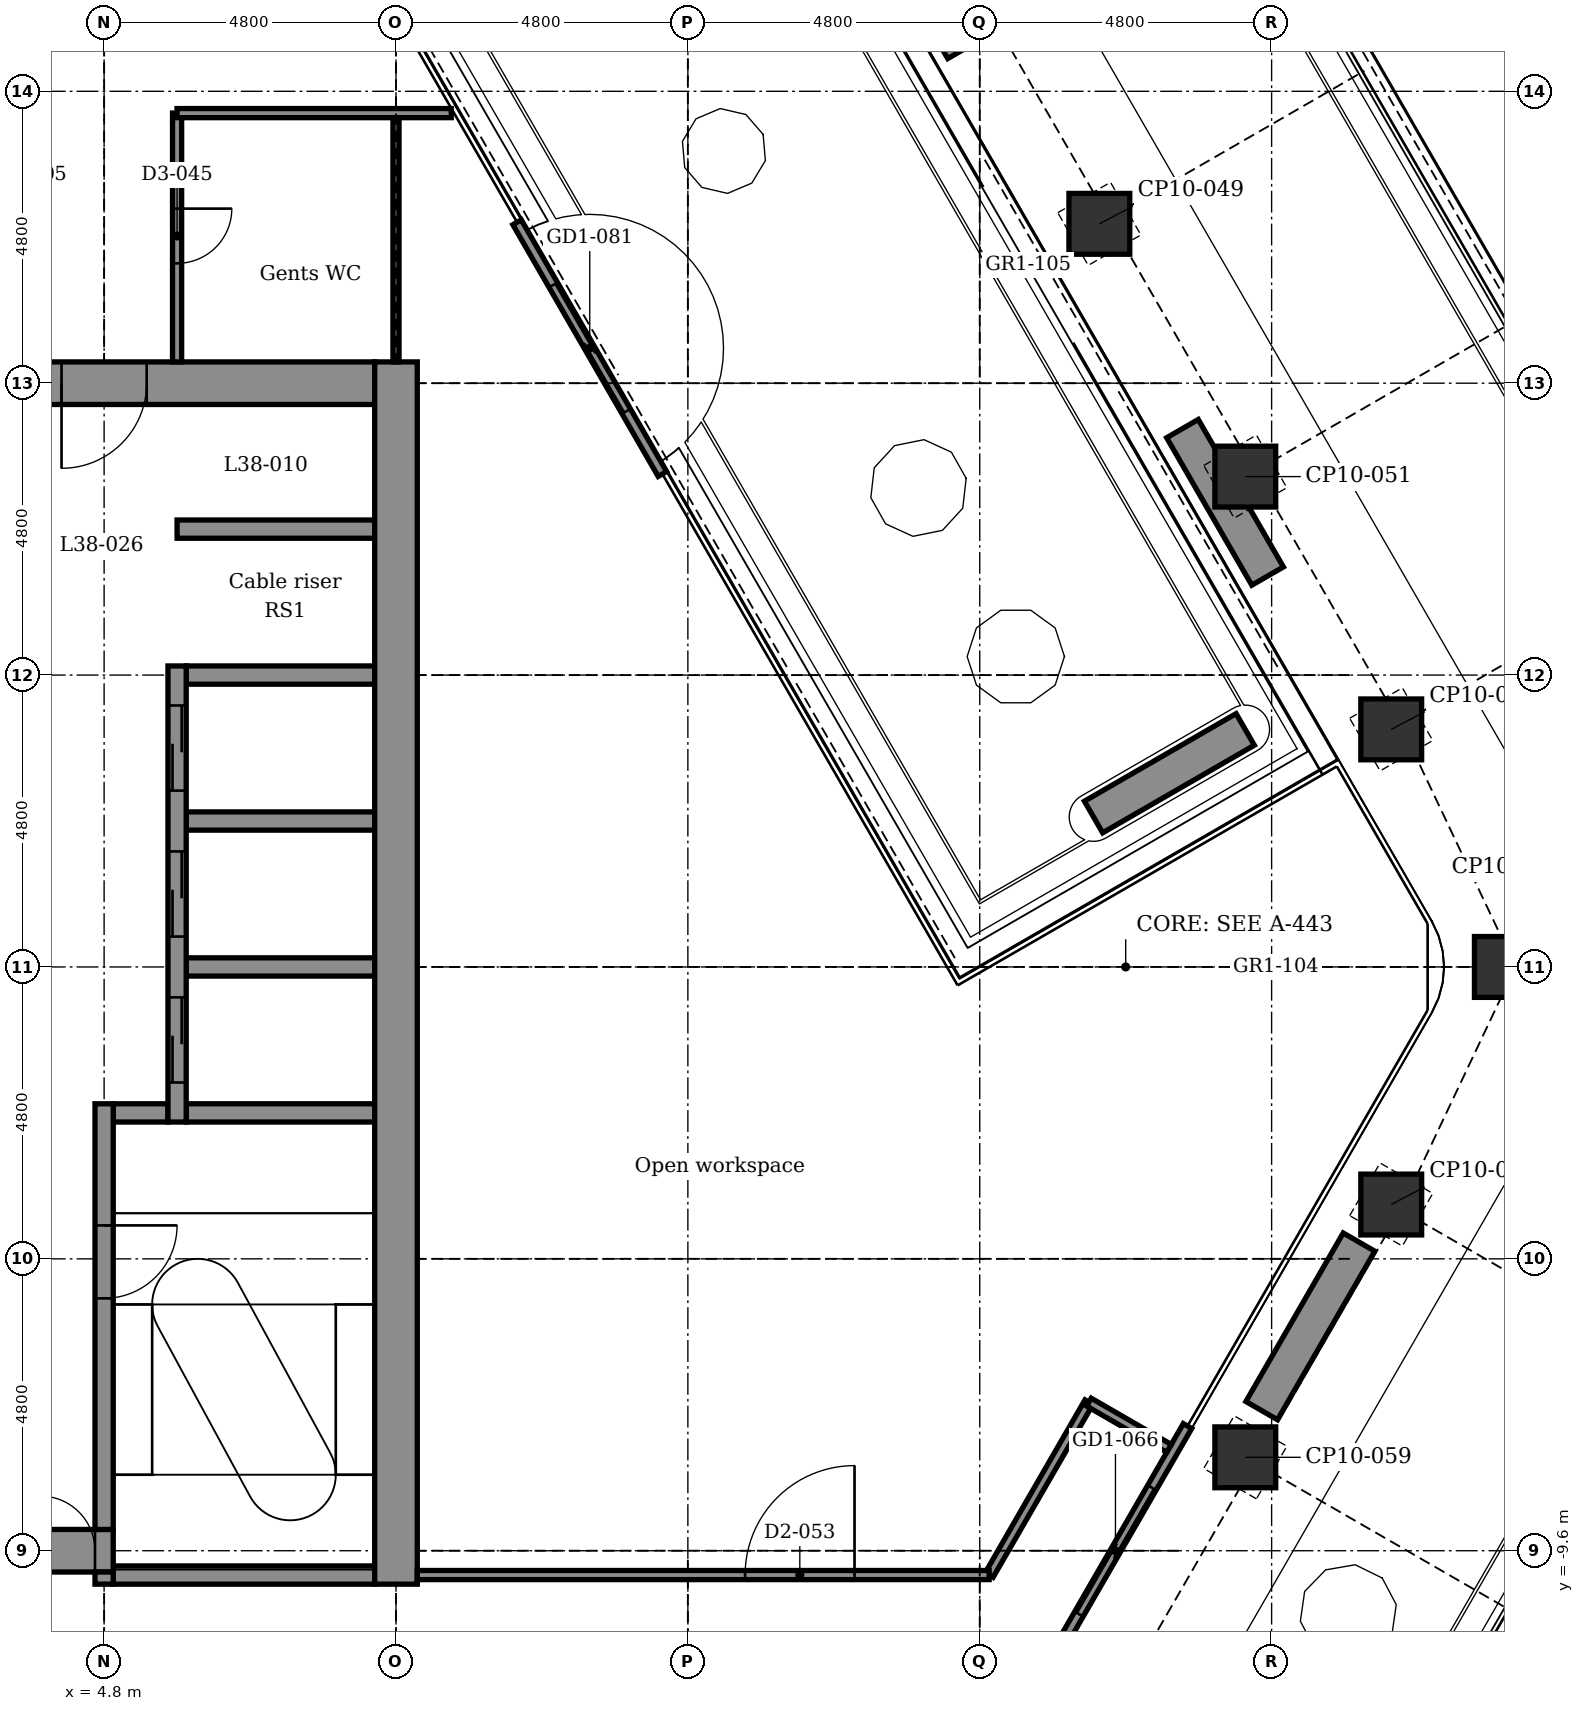
"""IFC4 building model, lengths in metres.
Left out: names, types, materials, properties, quantities, classifications, styles, units other than length and angle.
Written with IfcOpenShell. Run it as: python <this file> out.ifc"""

import sys

from ifc_helpers import new_model, si_unit, direction, frame, frame_2d, origin, origin_2d, place, context, subcontext, project, spatial, rectangle, extrude, element, fill, save


model = new_model("IFC4")
c1 = context("Model", 3, precision=1e-05, world=origin(), true_north=direction((0.0, 1.0)))
c2 = subcontext(c1, "Body", "Model", "MODEL_VIEW")
j1 = project(units=[si_unit("LENGTHUNIT", "METRE"), si_unit("PLANEANGLEUNIT", "RADIAN")], contexts=[c1])
p1 = place(None, origin())
s1 = spatial("IfcSite", under=j1, at=p1, CompositionType="ELEMENT")
p2 = place(p1, origin())
s2 = spatial("IfcBuilding", under=s1, at=p2, CompositionType="ELEMENT")
p3 = place(p2, frame((0.0, 0.0, 181.7)))
s3 = spatial("IfcBuildingStorey", under=s2, at=p3, CompositionType="ELEMENT", Elevation=181.7)
for number, where, z_axis, x_axis in (
    (1, (21.167, 12.221, -0.15), (0.0, 0.0, 1.0), (0.866, 0.5, 0.0)),
    (2, (23.567, 8.064, -0.15), (0.0, 0.0, 1.0), (0.866, 0.5, 0.0)),
    (3, (25.967, 3.907, -0.15), (0.0, 0.0, 1.0), (0.866, 0.5, 0.0)),
    (4, (27.836, 0.0, -0.15), (0.0, 0.0, 1.0), (1.0, 0.0, 0.0)),
    (5, (25.967, -3.907, -0.15), (0.0, 0.0, 1.0), (0.5, 0.866, 0.0)),
    (6, (23.567, -8.064, -0.15), (0.0, 0.0, 1.0), (0.5, 0.866, 0.0)),
):
    element("IfcColumn", number, at=place(p3, frame(where, z_axis=z_axis, x_axis=x_axis)), inside=s3, PredefinedType="COLUMN", context=c2, shape_type="SweptSolid", body=[
        extrude(rectangle(XDim=1.0, YDim=1.0, at=origin_2d()), origin(), (0.0, 0.0, 1.0), 3.9),
    ])
p4 = place(p3, frame((4.95, -10.0, -0.15), z_axis=(0.0, 0.0, 1.0), x_axis=(1.0, 0.0, 0.0)))
e7 = element("IfcWall", 7, at=p4, inside=s3, PredefinedType="STANDARD", context=c2, shape_type="SweptSolid", body=[
    extrude(rectangle(XDim=4.3, YDim=0.3, at=frame_2d((2.15, 0.0))), origin(), (0.0, 0.0, 1.0), 3.9),
])
p5 = place(p3, frame((-5.25, -9.6, -0.15), z_axis=(0.0, 0.0, 1.0), x_axis=(1.0, 0.0, 0.0)))
e8 = element("IfcWall", 8, at=p5, inside=s3, PredefinedType="SHEAR", context=c2, shape_type="SweptSolid", body=[
    extrude(rectangle(XDim=10.2, YDim=0.7, at=frame_2d((5.1, 0.0))), origin(), (0.0, 0.0, 1.0), 3.9),
])
p6 = place(p5, frame((9.0, 0.0, 0.15)))
e9 = element("IfcOpeningElement", 9, at=p6, cuts=e8, PredefinedType="OPENING", context=c2, shape_type="SweptSolid", body=[
    extrude(rectangle(XDim=0.9, YDim=2.1, at=frame_2d((0.45, 1.05))), frame((0.0, 0.36, 0.0), z_axis=(0.0, -1.0, 0.0), x_axis=(1.0, 0.0, 0.0)), (0.0, 0.0, 1.0), 0.72),
])
p7 = place(p3, frame((4.95, -2.4, -0.15), z_axis=(0.0, 0.0, 1.0), x_axis=(1.0, 0.0, 0.0)))
e10 = element("IfcWall", 10, at=p7, inside=s3, PredefinedType="STANDARD", context=c2, shape_type="SweptSolid", body=[
    extrude(rectangle(XDim=0.9, YDim=0.3, at=frame_2d((0.45, 0.0))), origin(), (0.0, 0.0, 1.0), 3.9),
])
for number, where, z_axis, x_axis in (
    (11, (6.15, -2.4, -0.15), (0.0, 0.0, 1.0), (1.0, 0.0, 0.0)),
    (12, (6.15, 0.0, -0.15), (0.0, 0.0, 1.0), (1.0, 0.0, 0.0)),
    (13, (6.15, 2.4, -0.15), (0.0, 0.0, 1.0), (1.0, 0.0, 0.0)),
    (14, (6.15, 4.8, -0.15), (0.0, 0.0, 1.0), (1.0, 0.0, 0.0)),
):
    element("IfcWall", number, at=place(p3, frame(where, z_axis=z_axis, x_axis=x_axis)), inside=s3, PredefinedType="STANDARD", context=c2, shape_type="SweptSolid", body=[
        extrude(rectangle(XDim=3.1, YDim=0.3, at=frame_2d((1.55, 0.0))), origin(), (0.0, 0.0, 1.0), 3.9),
    ])
p8 = place(p3, frame((6.0, 7.2, -0.15), z_axis=(0.0, 0.0, 1.0), x_axis=(1.0, 0.0, 0.0)))
e15 = element("IfcWall", 15, at=p8, inside=s3, PredefinedType="STANDARD", context=c2, shape_type="SweptSolid", body=[
    extrude(rectangle(XDim=3.25, YDim=0.3, at=frame_2d((1.625, 0.0))), origin(), (0.0, 0.0, 1.0), 3.9),
])
p9 = place(p3, frame((-5.25, 9.6, -0.15), z_axis=(0.0, 0.0, 1.0), x_axis=(1.0, 0.0, 0.0)))
e16 = element("IfcWall", 16, at=p9, inside=s3, PredefinedType="SHEAR", context=c2, shape_type="SweptSolid", body=[
    extrude(rectangle(XDim=14.5, YDim=0.7, at=frame_2d((7.25, 0.0))), origin(), (0.0, 0.0, 1.0), 3.9),
])
p10 = place(p9, frame((9.35, 0.0, 0.15)))
e17 = element("IfcOpeningElement", 17, at=p10, cuts=e16, PredefinedType="OPENING", context=c2, shape_type="SweptSolid", body=[
    extrude(rectangle(XDim=1.4, YDim=2.1, at=frame_2d((0.7, 1.05))), frame((0.0, 0.36, 0.0), z_axis=(0.0, -1.0, 0.0), x_axis=(1.0, 0.0, 0.0)), (0.0, 0.0, 1.0), 0.72),
])
p11 = place(p3, frame((4.8, -10.15, -0.15), z_axis=(0.0, 0.0, 1.0), x_axis=(0.0, 1.0, 0.0)))
e18 = element("IfcWall", 18, at=p11, inside=s3, PredefinedType="STANDARD", context=c2, shape_type="SweptSolid", body=[
    extrude(rectangle(XDim=0.2, YDim=0.3, at=frame_2d((0.1, 0.0))), origin(), (0.0, 0.0, 1.0), 3.9),
])
p12 = place(p3, frame((4.8, -9.25, -0.15), z_axis=(0.0, 0.0, 1.0), x_axis=(0.0, 1.0, 0.0)))
e19 = element("IfcWall", 19, at=p12, inside=s3, PredefinedType="STANDARD", context=c2, shape_type="SweptSolid", body=[
    extrude(rectangle(XDim=7.0, YDim=0.3, at=frame_2d((3.5, 0.0))), origin(), (0.0, 0.0, 1.0), 3.9),
])
p13 = place(p12, frame((3.8, 0.0, 0.15)))
e20 = element("IfcOpeningElement", 20, at=p13, cuts=e19, PredefinedType="OPENING", context=c2, shape_type="SweptSolid", body=[
    extrude(rectangle(XDim=1.2, YDim=2.1, at=frame_2d((0.6, 1.05))), frame((0.0, 0.16, 0.0), z_axis=(0.0, -1.0, 0.0), x_axis=(1.0, 0.0, 0.0)), (0.0, 0.0, 1.0), 0.32),
])
p14 = place(p3, frame((6.0, -2.55, -0.15), z_axis=(0.0, 0.0, 1.0), x_axis=(0.0, 1.0, 0.0)))
e21 = element("IfcWall", 21, at=p14, inside=s3, PredefinedType="STANDARD", context=c2, shape_type="SweptSolid", body=[
    extrude(rectangle(XDim=7.5, YDim=0.3, at=frame_2d((3.75, 0.0))), origin(), (0.0, 0.0, 1.0), 3.9),
])
p15 = place(p14, frame((0.65, 0.0, 0.15)))
e22 = element("IfcOpeningElement", 22, at=p15, cuts=e21, PredefinedType="OPENING", context=c2, shape_type="SweptSolid", body=[
    extrude(rectangle(XDim=1.4, YDim=2.1, at=frame_2d((0.7, 1.05))), frame((0.0, 0.16, 0.0), z_axis=(0.0, -1.0, 0.0), x_axis=(1.0, 0.0, 0.0)), (0.0, 0.0, 1.0), 0.32),
])
p16 = place(p14, frame((3.05, 0.0, 0.15)))
e23 = element("IfcOpeningElement", 23, at=p16, cuts=e21, PredefinedType="OPENING", context=c2, shape_type="SweptSolid", body=[
    extrude(rectangle(XDim=1.4, YDim=2.1, at=frame_2d((0.7, 1.05))), frame((0.0, 0.16, 0.0), z_axis=(0.0, -1.0, 0.0), x_axis=(1.0, 0.0, 0.0)), (0.0, 0.0, 1.0), 0.32),
])
p17 = place(p14, frame((5.45, 0.0, 0.15)))
e24 = element("IfcOpeningElement", 24, at=p17, cuts=e21, PredefinedType="OPENING", context=c2, shape_type="SweptSolid", body=[
    extrude(rectangle(XDim=1.4, YDim=2.1, at=frame_2d((0.7, 1.05))), frame((0.0, 0.16, 0.0), z_axis=(0.0, -1.0, 0.0), x_axis=(1.0, 0.0, 0.0)), (0.0, 0.0, 1.0), 0.32),
])
p18 = place(p3, frame((9.6, -10.15, -0.15), z_axis=(0.0, 0.0, 1.0), x_axis=(0.0, 1.0, 0.0)))
e25 = element("IfcWall", 25, at=p18, inside=s3, PredefinedType="SHEAR", context=c2, shape_type="SweptSolid", body=[
    extrude(rectangle(XDim=20.1, YDim=0.7, at=frame_2d((10.05, 0.0))), origin(), (0.0, 0.0, 1.0), 3.9),
])
p19 = place(p3, frame((11.591, 12.246, 0.0), z_axis=(0.0, 0.0, 1.0), x_axis=(0.49997888657, -0.866037593286, 0.0)))
e26 = element("IfcWall", 26, at=p19, inside=s3, PredefinedType="PARTITIONING", context=c2, shape_type="SweptSolid", body=[
    extrude(rectangle(XDim=4.78, YDim=0.16, at=frame_2d((2.39, 0.0))), origin(), (0.0, 0.0, 1.0), 3.75),
])
p20 = place(p19, frame((1.19, 0.0, 0.0)))
e27 = element("IfcOpeningElement", 27, at=p20, cuts=e26, PredefinedType="OPENING", context=c2, shape_type="SweptSolid", body=[
    extrude(rectangle(XDim=2.4, YDim=2.4, at=frame_2d((1.2, 1.2))), frame((0.0, 0.09, 0.0), z_axis=(0.0, -1.0, 0.0), x_axis=(1.0, 0.0, 0.0)), (0.0, 0.0, 1.0), 0.18),
])
p21 = place(p3, frame((22.617, -7.55, 0.0), z_axis=(0.0, 0.0, 1.0), x_axis=(-0.5000167099, -0.866015756104, 0.0)))
e28 = element("IfcWall", 28, at=p21, inside=s3, PredefinedType="PARTITIONING", context=c2, shape_type="SweptSolid", body=[
    extrude(rectangle(XDim=4.74, YDim=0.16, at=frame_2d((2.37, 0.0))), origin(), (0.0, 0.0, 1.0), 3.75),
])
p22 = place(p21, frame((1.17, 0.0, 0.0)))
e29 = element("IfcOpeningElement", 29, at=p22, cuts=e28, PredefinedType="OPENING", context=c2, shape_type="SweptSolid", body=[
    extrude(rectangle(XDim=2.4, YDim=2.4, at=frame_2d((1.2, 1.2))), frame((0.0, 0.09, 0.0), z_axis=(0.0, -1.0, 0.0), x_axis=(1.0, 0.0, 0.0)), (0.0, 0.0, 1.0), 0.18),
])
p23 = place(p3, frame((25.437, -4.525, 0.0), z_axis=(0.0, 0.0, 1.0), x_axis=(-0.499938187974, -0.866061088033, 0.0)))
e30 = element("IfcWall", 30, at=p23, inside=s3, PredefinedType="USERDEFINED", context=c2, shape_type="SweptSolid", body=[
    extrude(rectangle(XDim=3.2, YDim=0.6, at=frame_2d((1.6, 0.0))), origin(), (0.0, 0.0, 1.0), 0.7),
])
p24 = place(p3, frame((21.072, 2.466, 0.0), z_axis=(0.0, 0.0, 1.0), x_axis=(0.865996417519, 0.500050202324, 0.0)))
e31 = element("IfcWall", 31, at=p24, inside=s3, PredefinedType="USERDEFINED", context=c2, shape_type="SweptSolid", body=[
    extrude(rectangle(XDim=2.88, YDim=0.6, at=frame_2d((1.44, 0.0))), origin(), (0.0, 0.0, 1.0), 0.7),
])
p25 = place(p3, frame((18.934, 15.088, 0.0), z_axis=(0.0, 0.0, 1.0), x_axis=(-0.500011755427, 0.866018616679, 0.0)))
e32 = element("IfcWall", 32, at=p25, inside=s3, PredefinedType="USERDEFINED", context=c2, shape_type="SweptSolid", body=[
    extrude(rectangle(XDim=2.8, YDim=0.6, at=frame_2d((1.4, 0.0))), origin(), (0.0, 0.0, 1.0), 0.7),
])
p26 = place(p3, frame((22.534, 8.853, 0.0), z_axis=(0.0, 0.0, 1.0), x_axis=(0.500049511043, -0.865996816683, 0.0)))
e33 = element("IfcWall", 33, at=p26, inside=s3, PredefinedType="USERDEFINED", context=c2, shape_type="SweptSolid", body=[
    extrude(rectangle(XDim=2.8, YDim=0.6, at=frame_2d((1.4, 0.0))), origin(), (0.0, 0.0, 1.0), 0.7),
])
p27 = place(p3, frame((9.6, 9.95, 0.0), z_axis=(0.0, 0.0, 1.0), x_axis=(0.0, 1.0, 0.0)))
e34 = element("IfcWall", 34, at=p27, inside=s3, PredefinedType="PARTITIONING", context=c2, shape_type="SweptSolid", body=[
    extrude(rectangle(XDim=4.092, YDim=0.1, at=frame_2d((2.046, 0.0))), origin(), (0.0, 0.0, 1.0), 3.066),
])
p28 = place(p3, frame((6.0, 9.95, 0.0), z_axis=(0.0, 0.0, 1.0), x_axis=(0.0, 1.0, 0.0)))
e35 = element("IfcWall", 35, at=p28, inside=s3, PredefinedType="PARTITIONING", context=c2, shape_type="SweptSolid", body=[
    extrude(rectangle(XDim=4.092, YDim=0.15, at=frame_2d((2.046, 0.0))), origin(), (0.0, 0.0, 1.0), 3.75),
])
p29 = place(p28, frame((1.621, 0.0, 0.0)))
e36 = element("IfcOpeningElement", 36, at=p29, cuts=e35, PredefinedType="OPENING", context=c2, shape_type="SweptSolid", body=[
    extrude(rectangle(XDim=0.9, YDim=2.1, at=frame_2d((0.45, 1.05))), frame((0.0, 0.085, 0.0), z_axis=(0.0, -1.0, 0.0), x_axis=(1.0, 0.0, 0.0)), (0.0, 0.0, 1.0), 0.17),
])
p30 = place(p3, frame((19.354, -10.0, 0.0), z_axis=(0.0, 0.0, 1.0), x_axis=(0.500009969958, 0.86601964755, 0.0)))
e37 = element("IfcWall", 37, at=p30, inside=s3, PredefinedType="PARTITIONING", context=c2, shape_type="SweptSolid", body=[
    extrude(rectangle(XDim=3.283, YDim=0.15, at=frame_2d((1.642, 0.0))), origin(), (0.0, 0.0, 1.0), 3.75),
])
p31 = place(p3, frame((20.996, -7.157, 0.0), z_axis=(0.0, 0.0, 1.0), x_axis=(0.865960906633, -0.500111695708, 0.0)))
e38 = element("IfcWall", 38, at=p31, inside=s3, PredefinedType="PARTITIONING", context=c2, shape_type="SweptSolid", body=[
    extrude(rectangle(XDim=1.52, YDim=0.15, at=frame_2d((0.76, 0.0))), origin(), (0.0, 0.0, 1.0), 3.75),
])
p32 = place(p3, frame((9.95, -10.0, 0.0), z_axis=(0.0, 0.0, 1.0), x_axis=(1.0, 0.0, 0.0)))
e39 = element("IfcWall", 39, at=p32, inside=s3, PredefinedType="PARTITIONING", context=c2, shape_type="SweptSolid", body=[
    extrude(rectangle(XDim=9.405, YDim=0.15, at=frame_2d((4.702, 0.0))), origin(), (0.0, 0.0, 1.0), 3.75),
])
p33 = place(p32, frame((5.391, 0.0, 0.0)))
e40 = element("IfcOpeningElement", 40, at=p33, cuts=e39, PredefinedType="OPENING", context=c2, shape_type="SweptSolid", body=[
    extrude(rectangle(XDim=1.8, YDim=2.1, at=frame_2d((0.9, 1.05))), frame((0.0, 0.085, 0.0), z_axis=(0.0, -1.0, 0.0), x_axis=(1.0, 0.0, 0.0)), (0.0, 0.0, 1.0), 0.17),
])
p34 = place(p3, frame((6.0, 14.042, 0.0), z_axis=(0.0, 0.0, 1.0), x_axis=(1.0, 0.0, 0.0)))
e41 = element("IfcWall", 41, at=p34, inside=s3, PredefinedType="PARTITIONING", context=c2, shape_type="SweptSolid", body=[
    extrude(rectangle(XDim=4.509, YDim=0.15, at=frame_2d((2.254, 0.0))), origin(), (0.0, 0.0, 1.0), 3.75),
])
p35 = place(p20, origin())
e42 = element("IfcDoor", 42, at=p35, inside=s3, OperationType="DOUBLE_DOOR_SLIDING", PredefinedType="DOOR", context=c2, shape_type="SweptSolid", body=[
    extrude(rectangle(XDim=2.4, YDim=2.4, at=frame_2d((1.2, 1.2))), frame((0.0, 0.025, 0.0), z_axis=(0.0, -1.0, 0.0), x_axis=(1.0, 0.0, 0.0)), (0.0, 0.0, 1.0), 0.05),
])
fill(e27, e42)
p36 = place(p22, origin())
e43 = element("IfcDoor", 43, at=p36, inside=s3, OperationType="DOUBLE_DOOR_SLIDING", PredefinedType="DOOR", context=c2, shape_type="SweptSolid", body=[
    extrude(rectangle(XDim=2.4, YDim=2.4, at=frame_2d((1.2, 1.2))), frame((0.0, 0.025, 0.0), z_axis=(0.0, -1.0, 0.0), x_axis=(1.0, 0.0, 0.0)), (0.0, 0.0, 1.0), 0.05),
])
fill(e29, e43)
p37 = place(p29, frame((0.9, 0.0, 0.0), z_axis=(0.0, 0.0, 1.0), x_axis=(-1.0, 0.0, 0.0)))
e44 = element("IfcDoor", 44, at=p37, inside=s3, OperationType="SINGLE_SWING_RIGHT", PredefinedType="DOOR", context=c2, shape_type="SweptSolid", body=[
    extrude(rectangle(XDim=0.9, YDim=2.1, at=frame_2d((0.45, 1.05))), frame((0.0, 0.025, 0.0), z_axis=(0.0, -1.0, 0.0), x_axis=(1.0, 0.0, 0.0)), (0.0, 0.0, 1.0), 0.05),
])
fill(e36, e44)
p38 = place(p33, origin())
e45 = element("IfcDoor", 45, at=p38, inside=s3, OperationType="SINGLE_SWING_RIGHT", PredefinedType="DOOR", context=c2, shape_type="SweptSolid", body=[
    extrude(rectangle(XDim=1.8, YDim=2.1, at=frame_2d((0.9, 1.05))), frame((0.0, 0.025, 0.0), z_axis=(0.0, -1.0, 0.0), x_axis=(1.0, 0.0, 0.0)), (0.0, 0.0, 1.0), 0.05),
])
fill(e40, e45)
p39 = place(p15, origin())
e46 = element("IfcDoor", 46, at=p39, inside=s3, OperationType="DOUBLE_DOOR_SLIDING", PredefinedType="DOOR", context=c2, shape_type="SweptSolid", body=[
    extrude(rectangle(XDim=1.4, YDim=2.1, at=frame_2d((0.7, 1.05))), frame((0.0, 0.025, 0.0), z_axis=(0.0, -1.0, 0.0), x_axis=(1.0, 0.0, 0.0)), (0.0, 0.0, 1.0), 0.05),
])
fill(e22, e46)
p40 = place(p16, origin())
e47 = element("IfcDoor", 47, at=p40, inside=s3, OperationType="DOUBLE_DOOR_SLIDING", PredefinedType="DOOR", context=c2, shape_type="SweptSolid", body=[
    extrude(rectangle(XDim=1.4, YDim=2.1, at=frame_2d((0.7, 1.05))), frame((0.0, 0.025, 0.0), z_axis=(0.0, -1.0, 0.0), x_axis=(1.0, 0.0, 0.0)), (0.0, 0.0, 1.0), 0.05),
])
fill(e23, e47)
p41 = place(p17, origin())
e48 = element("IfcDoor", 48, at=p41, inside=s3, OperationType="DOUBLE_DOOR_SLIDING", PredefinedType="DOOR", context=c2, shape_type="SweptSolid", body=[
    extrude(rectangle(XDim=1.4, YDim=2.1, at=frame_2d((0.7, 1.05))), frame((0.0, 0.025, 0.0), z_axis=(0.0, -1.0, 0.0), x_axis=(1.0, 0.0, 0.0)), (0.0, 0.0, 1.0), 0.05),
])
fill(e24, e48)
p42 = place(p13, frame((1.2, 0.0, 0.0), z_axis=(0.0, 0.0, 1.0), x_axis=(-1.0, 0.0, 0.0)))
e49 = element("IfcDoor", 49, at=p42, inside=s3, OperationType="SINGLE_SWING_RIGHT", PredefinedType="DOOR", context=c2, shape_type="SweptSolid", body=[
    extrude(rectangle(XDim=1.2, YDim=2.1, at=frame_2d((0.6, 1.05))), frame((0.0, 0.025, 0.0), z_axis=(0.0, -1.0, 0.0), x_axis=(1.0, 0.0, 0.0)), (0.0, 0.0, 1.0), 0.05),
])
fill(e20, e49)
p43 = place(p10, frame((1.4, 0.0, 0.0), z_axis=(0.0, 0.0, 1.0), x_axis=(-1.0, 0.0, 0.0)))
e50 = element("IfcDoor", 50, at=p43, inside=s3, OperationType="SINGLE_SWING_LEFT", PredefinedType="DOOR", context=c2, shape_type="SweptSolid", body=[
    extrude(rectangle(XDim=1.4, YDim=2.1, at=frame_2d((0.7, 1.05))), frame((0.0, 0.025, 0.0), z_axis=(0.0, -1.0, 0.0), x_axis=(1.0, 0.0, 0.0)), (0.0, 0.0, 1.0), 0.05),
])
fill(e17, e50)
p44 = place(p6, origin())
e51 = element("IfcDoor", 51, at=p44, inside=s3, OperationType="SINGLE_SWING_LEFT", PredefinedType="DOOR", context=c2, shape_type="SweptSolid", body=[
    extrude(rectangle(XDim=0.9, YDim=2.1, at=frame_2d((0.45, 1.05))), frame((0.0, 0.025, 0.0), z_axis=(0.0, -1.0, 0.0), x_axis=(1.0, 0.0, 0.0)), (0.0, 0.0, 1.0), 0.05),
])
fill(e9, e51)
save(model, sys.argv[1])
